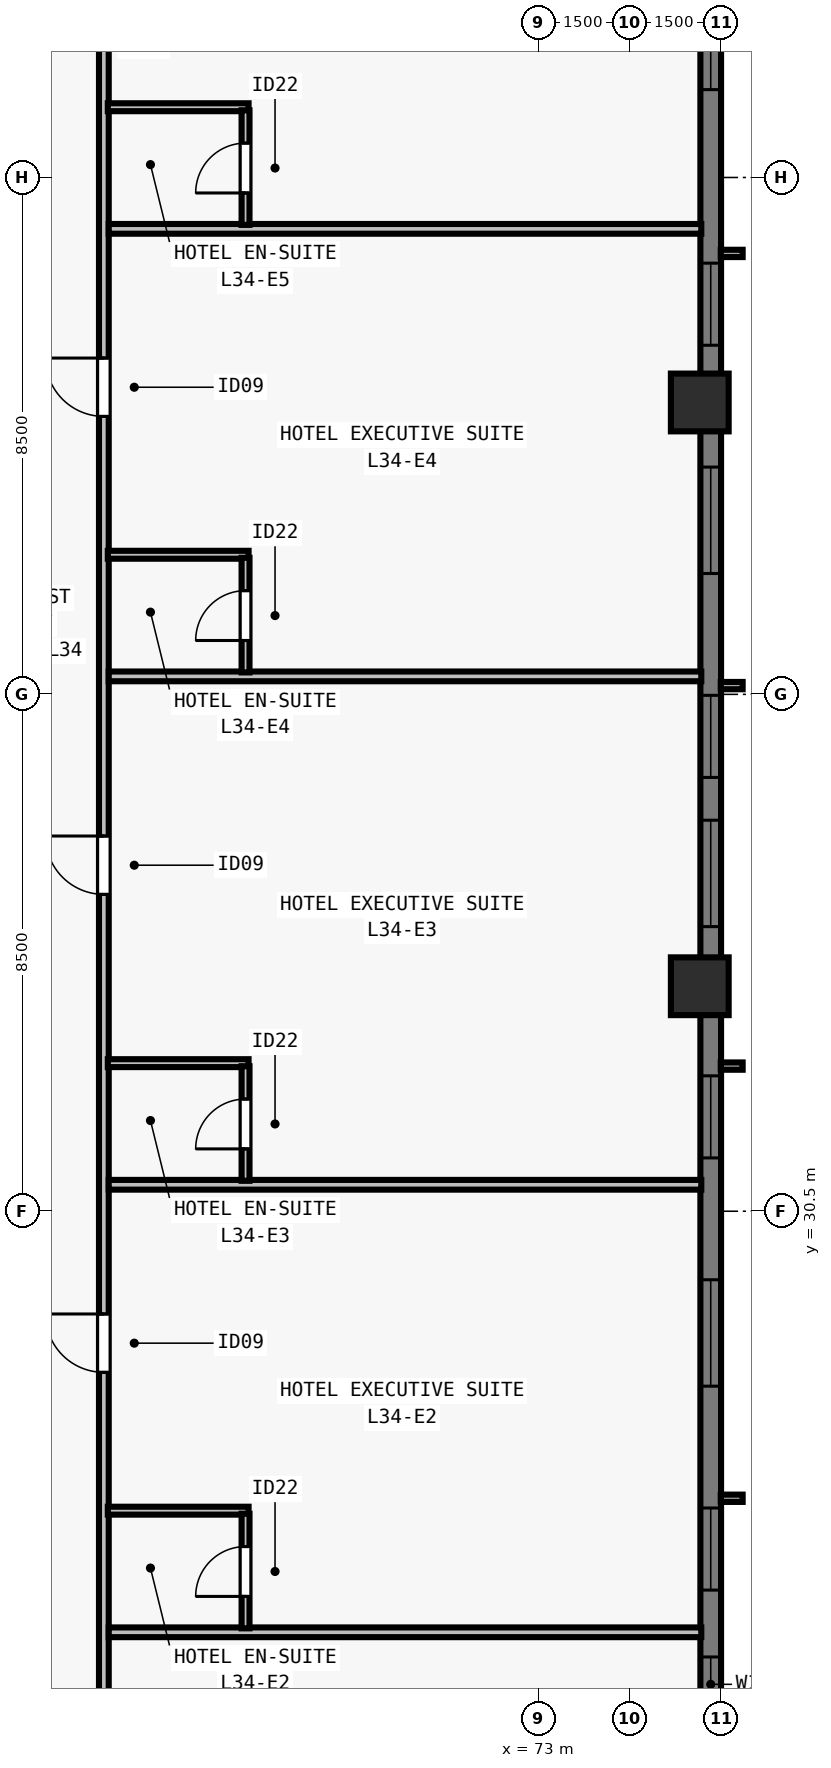
"""IFC4 building model, lengths in metres.
Left out: names, types, materials, properties, quantities, classifications, styles, units other than length and angle.
Written with IfcOpenShell. Run it as: python <this file> out.ifc"""

import sys

from ifc_helpers import new_model, si_unit, direction, frame, frame_2d, origin, origin_2d, place, context, subcontext, project, spatial, rectangle, extrude, element, fill, save


model = new_model("IFC4")
c1 = context("Model", 3, precision=1e-05, world=origin(), true_north=direction((0.0, 1.0)))
c2 = subcontext(c1, "Body", "Model", "MODEL_VIEW")
j1 = project(units=[si_unit("LENGTHUNIT", "METRE"), si_unit("PLANEANGLEUNIT", "RADIAN")], contexts=[c1])
p1 = place(None, origin())
s1 = spatial("IfcSite", under=j1, at=p1, CompositionType="ELEMENT")
p2 = place(p1, origin())
s2 = spatial("IfcBuilding", under=s1, at=p2, CompositionType="ELEMENT")
p3 = place(p2, frame((0.0, 0.0, 127.0)))
s3 = spatial("IfcBuildingStorey", under=s2, at=p3, CompositionType="ELEMENT", Elevation=127.0)
for number, where, z_axis, x_axis in (
    (1, (75.65, 34.2, 0.0), (0.0, 0.0, 1.0), (0.0, 1.0, 0.0)),
    (2, (75.65, 43.8, 0.0), (0.0, 0.0, 1.0), (0.0, 1.0, 0.0)),
):
    element("IfcColumn", number, at=place(p3, frame(where, z_axis=z_axis, x_axis=x_axis)), inside=s3, PredefinedType="COLUMN", context=c2, shape_type="SweptSolid", body=[
        extrude(rectangle(XDim=0.95, YDim=0.95, at=origin_2d()), origin(), (0.0, 0.0, 1.0), 3.5),
    ])
p4 = place(p3, frame((75.83, 59.0, 0.0), z_axis=(0.0, 0.0, 1.0), x_axis=(0.0, -1.0, 0.0)))
e3 = element("IfcWall", 3, at=p4, inside=s3, PredefinedType="SOLIDWALL", context=c2, shape_type="SweptSolid", body=[
    extrude(rectangle(XDim=39.682, YDim=0.34, at=frame_2d((19.841, 0.0))), origin(), (0.0, 0.0, 1.0), 3.28),
])
p5 = place(p4, frame((4.952, 0.0, 0.8)))
e4 = element("IfcOpeningElement", 4, at=p5, cuts=e3, PredefinedType="OPENING", context=c2, shape_type="SweptSolid", body=[
    extrude(rectangle(XDim=1.35, YDim=1.66, at=frame_2d((0.675, 0.83))), frame((0.0, 0.18, 0.0), z_axis=(0.0, -1.0, 0.0), x_axis=(1.0, 0.0, 0.0)), (0.0, 0.0, 1.0), 0.36),
])
p6 = place(p4, frame((8.305, 0.0, 0.8)))
e5 = element("IfcOpeningElement", 5, at=p6, cuts=e3, PredefinedType="OPENING", context=c2, shape_type="SweptSolid", body=[
    extrude(rectangle(XDim=1.75, YDim=1.66, at=frame_2d((0.875, 0.83))), frame((0.0, 0.18, 0.0), z_axis=(0.0, -1.0, 0.0), x_axis=(1.0, 0.0, 0.0)), (0.0, 0.0, 1.0), 0.36),
])
p7 = place(p4, frame((12.909, 0.0, 0.8)))
e6 = element("IfcOpeningElement", 6, at=p7, cuts=e3, PredefinedType="OPENING", context=c2, shape_type="SweptSolid", body=[
    extrude(rectangle(XDim=1.35, YDim=1.66, at=frame_2d((0.675, 0.83))), frame((0.0, 0.18, 0.0), z_axis=(0.0, -1.0, 0.0), x_axis=(1.0, 0.0, 0.0)), (0.0, 0.0, 1.0), 0.36),
])
p8 = place(p4, frame((16.262, 0.0, 0.8)))
e7 = element("IfcOpeningElement", 7, at=p8, cuts=e3, PredefinedType="OPENING", context=c2, shape_type="SweptSolid", body=[
    extrude(rectangle(XDim=1.75, YDim=1.66, at=frame_2d((0.875, 0.83))), frame((0.0, 0.18, 0.0), z_axis=(0.0, -1.0, 0.0), x_axis=(1.0, 0.0, 0.0)), (0.0, 0.0, 1.0), 0.36),
])
p9 = place(p4, frame((20.016, 0.0, 0.8)))
e8 = element("IfcOpeningElement", 8, at=p9, cuts=e3, PredefinedType="OPENING", context=c2, shape_type="SweptSolid", body=[
    extrude(rectangle(XDim=1.35, YDim=1.66, at=frame_2d((0.675, 0.83))), frame((0.0, 0.18, 0.0), z_axis=(0.0, -1.0, 0.0), x_axis=(1.0, 0.0, 0.0)), (0.0, 0.0, 1.0), 0.36),
])
p10 = place(p4, frame((22.07, 0.0, 0.8)))
e9 = element("IfcOpeningElement", 9, at=p10, cuts=e3, PredefinedType="OPENING", context=c2, shape_type="SweptSolid", body=[
    extrude(rectangle(XDim=1.75, YDim=1.66, at=frame_2d((0.875, 0.83))), frame((0.0, 0.18, 0.0), z_axis=(0.0, -1.0, 0.0), x_axis=(1.0, 0.0, 0.0)), (0.0, 0.0, 1.0), 0.36),
])
p11 = place(p4, frame((26.273, 0.0, 0.8)))
e10 = element("IfcOpeningElement", 10, at=p11, cuts=e3, PredefinedType="OPENING", context=c2, shape_type="SweptSolid", body=[
    extrude(rectangle(XDim=1.35, YDim=1.66, at=frame_2d((0.675, 0.83))), frame((0.0, 0.18, 0.0), z_axis=(0.0, -1.0, 0.0), x_axis=(1.0, 0.0, 0.0)), (0.0, 0.0, 1.0), 0.36),
])
p12 = place(p4, frame((29.627, 0.0, 0.8)))
e11 = element("IfcOpeningElement", 11, at=p12, cuts=e3, PredefinedType="OPENING", context=c2, shape_type="SweptSolid", body=[
    extrude(rectangle(XDim=1.75, YDim=1.66, at=frame_2d((0.875, 0.83))), frame((0.0, 0.18, 0.0), z_axis=(0.0, -1.0, 0.0), x_axis=(1.0, 0.0, 0.0)), (0.0, 0.0, 1.0), 0.36),
])
p13 = place(p4, frame((33.38, 0.0, 0.8)))
e12 = element("IfcOpeningElement", 12, at=p13, cuts=e3, PredefinedType="OPENING", context=c2, shape_type="SweptSolid", body=[
    extrude(rectangle(XDim=1.35, YDim=1.66, at=frame_2d((0.675, 0.83))), frame((0.0, 0.18, 0.0), z_axis=(0.0, -1.0, 0.0), x_axis=(1.0, 0.0, 0.0)), (0.0, 0.0, 1.0), 0.36),
])
p14 = place(p4, frame((35.83, 0.0, 0.8)))
e13 = element("IfcOpeningElement", 13, at=p14, cuts=e3, PredefinedType="OPENING", context=c2, shape_type="SweptSolid", body=[
    extrude(rectangle(XDim=0.9, YDim=1.66, at=frame_2d((0.45, 0.83))), frame((0.0, 0.18, 0.0), z_axis=(0.0, -1.0, 0.0), x_axis=(1.0, 0.0, 0.0)), (0.0, 0.0, 1.0), 0.36),
])
p15 = place(p3, frame((65.85, 15.325, 0.0), z_axis=(0.0, 0.0, 1.0), x_axis=(0.0, 1.0, 0.0)))
e14 = element("IfcWall", 14, at=p15, inside=s3, PredefinedType="PARTITIONING", context=c2, shape_type="SweptSolid", body=[
    extrude(rectangle(XDim=47.35, YDim=0.16, at=frame_2d((23.675, 0.0))), origin(), (0.0, 0.0, 1.0), 2.555),
])
p16 = place(p15, frame((4.993, 0.0, 0.0)))
e15 = element("IfcOpeningElement", 15, at=p16, cuts=e14, PredefinedType="OPENING", context=c2, shape_type="SweptSolid", body=[
    extrude(rectangle(XDim=0.96, YDim=2.15, at=frame_2d((0.48, 1.075))), frame((0.0, 0.09, 0.0), z_axis=(0.0, -1.0, 0.0), x_axis=(1.0, 0.0, 0.0)), (0.0, 0.0, 1.0), 0.18),
])
p17 = place(p15, frame((12.525, 0.0, 0.0)))
e16 = element("IfcOpeningElement", 16, at=p17, cuts=e14, PredefinedType="OPENING", context=c2, shape_type="SweptSolid", body=[
    extrude(rectangle(XDim=0.96, YDim=2.15, at=frame_2d((0.48, 1.075))), frame((0.0, 0.09, 0.0), z_axis=(0.0, -1.0, 0.0), x_axis=(1.0, 0.0, 0.0)), (0.0, 0.0, 1.0), 0.18),
])
p18 = place(p15, frame((20.385, 0.0, 0.0)))
e17 = element("IfcOpeningElement", 17, at=p18, cuts=e14, PredefinedType="OPENING", context=c2, shape_type="SweptSolid", body=[
    extrude(rectangle(XDim=0.96, YDim=2.15, at=frame_2d((0.48, 1.075))), frame((0.0, 0.09, 0.0), z_axis=(0.0, -1.0, 0.0), x_axis=(1.0, 0.0, 0.0)), (0.0, 0.0, 1.0), 0.18),
])
p19 = place(p15, frame((28.246, 0.0, 0.0)))
e18 = element("IfcOpeningElement", 18, at=p19, cuts=e14, PredefinedType="OPENING", context=c2, shape_type="SweptSolid", body=[
    extrude(rectangle(XDim=0.96, YDim=2.15, at=frame_2d((0.48, 1.075))), frame((0.0, 0.09, 0.0), z_axis=(0.0, -1.0, 0.0), x_axis=(1.0, 0.0, 0.0)), (0.0, 0.0, 1.0), 0.18),
])
p20 = place(p15, frame((36.105, 0.0, 0.0)))
e19 = element("IfcOpeningElement", 19, at=p20, cuts=e14, PredefinedType="OPENING", context=c2, shape_type="SweptSolid", body=[
    extrude(rectangle(XDim=0.96, YDim=2.15, at=frame_2d((0.48, 1.075))), frame((0.0, 0.09, 0.0), z_axis=(0.0, -1.0, 0.0), x_axis=(1.0, 0.0, 0.0)), (0.0, 0.0, 1.0), 0.18),
])
p21 = place(p15, frame((44.068, 0.0, 0.0)))
e20 = element("IfcOpeningElement", 20, at=p21, cuts=e14, PredefinedType="OPENING", context=c2, shape_type="SweptSolid", body=[
    extrude(rectangle(XDim=0.96, YDim=2.15, at=frame_2d((0.48, 1.075))), frame((0.0, 0.09, 0.0), z_axis=(0.0, -1.0, 0.0), x_axis=(1.0, 0.0, 0.0)), (0.0, 0.0, 1.0), 0.18),
])
p22 = place(p3, frame((65.93, 23.576, 0.0), z_axis=(0.0, 0.0, 1.0), x_axis=(1.0, 0.0, 0.0)))
e21 = element("IfcWall", 21, at=p22, inside=s3, PredefinedType="PARTITIONING", context=c2, shape_type="SweptSolid", body=[
    extrude(rectangle(XDim=9.745, YDim=0.16, at=frame_2d((4.873, 0.0))), origin(), (0.0, 0.0, 1.0), 2.896),
])
p23 = place(p3, frame((65.915, 25.576, 0.0), z_axis=(0.0, 0.0, 1.0), x_axis=(1.0, 0.0, 0.0)))
e22 = element("IfcWall", 22, at=p23, inside=s3, PredefinedType="PLUMBINGWALL", context=c2, shape_type="SweptSolid", body=[
    extrude(rectangle(XDim=2.315, YDim=0.13, at=frame_2d((1.157, 0.0))), origin(), (0.0, 0.0, 1.0), 2.896),
])
p24 = place(p3, frame((68.18, 23.641, 0.0), z_axis=(0.0, 0.0, 1.0), x_axis=(0.0, 1.0, 0.0)))
e23 = element("IfcWall", 23, at=p24, inside=s3, PredefinedType="PLUMBINGWALL", context=c2, shape_type="SweptSolid", body=[
    extrude(rectangle(XDim=1.885, YDim=0.13, at=frame_2d((0.942, 0.0))), origin(), (0.0, 0.0, 1.0), 3.28),
])
p25 = place(p24, frame((0.525, 0.0, 0.0)))
e24 = element("IfcOpeningElement", 24, at=p25, cuts=e23, PredefinedType="OPENING", context=c2, shape_type="SweptSolid", body=[
    extrude(rectangle(XDim=0.82, YDim=2.1, at=frame_2d((0.41, 1.05))), frame((0.0, 0.075, 0.0), z_axis=(0.0, -1.0, 0.0), x_axis=(1.0, 0.0, 0.0)), (0.0, 0.0, 1.0), 0.15),
])
p26 = place(p3, frame((65.93, 30.935, 0.0), z_axis=(0.0, 0.0, 1.0), x_axis=(1.0, 0.0, 0.0)))
e25 = element("IfcWall", 25, at=p26, inside=s3, PredefinedType="PARTITIONING", context=c2, shape_type="SweptSolid", body=[
    extrude(rectangle(XDim=9.745, YDim=0.16, at=frame_2d((4.873, 0.0))), origin(), (0.0, 0.0, 1.0), 3.28),
])
p27 = place(p3, frame((65.915, 32.935, 0.0), z_axis=(0.0, 0.0, 1.0), x_axis=(1.0, 0.0, 0.0)))
e26 = element("IfcWall", 26, at=p27, inside=s3, PredefinedType="PLUMBINGWALL", context=c2, shape_type="SweptSolid", body=[
    extrude(rectangle(XDim=2.315, YDim=0.13, at=frame_2d((1.157, 0.0))), origin(), (0.0, 0.0, 1.0), 3.28),
])
p28 = place(p3, frame((68.18, 31.0, 0.0), z_axis=(0.0, 0.0, 1.0), x_axis=(0.0, 1.0, 0.0)))
e27 = element("IfcWall", 27, at=p28, inside=s3, PredefinedType="PLUMBINGWALL", context=c2, shape_type="SweptSolid", body=[
    extrude(rectangle(XDim=1.885, YDim=0.13, at=frame_2d((0.942, 0.0))), origin(), (0.0, 0.0, 1.0), 3.28),
])
p29 = place(p28, frame((0.525, 0.0, 0.0)))
e28 = element("IfcOpeningElement", 28, at=p29, cuts=e27, PredefinedType="OPENING", context=c2, shape_type="SweptSolid", body=[
    extrude(rectangle(XDim=0.82, YDim=2.1, at=frame_2d((0.41, 1.05))), frame((0.0, 0.075, 0.0), z_axis=(0.0, -1.0, 0.0), x_axis=(1.0, 0.0, 0.0)), (0.0, 0.0, 1.0), 0.15),
])
p30 = place(p3, frame((65.93, 39.296, 0.0), z_axis=(0.0, 0.0, 1.0), x_axis=(1.0, 0.0, 0.0)))
e29 = element("IfcWall", 29, at=p30, inside=s3, PredefinedType="PARTITIONING", context=c2, shape_type="SweptSolid", body=[
    extrude(rectangle(XDim=9.745, YDim=0.16, at=frame_2d((4.873, 0.0))), origin(), (0.0, 0.0, 1.0), 3.28),
])
p31 = place(p3, frame((65.915, 41.296, 0.0), z_axis=(0.0, 0.0, 1.0), x_axis=(1.0, 0.0, 0.0)))
e30 = element("IfcWall", 30, at=p31, inside=s3, PredefinedType="PLUMBINGWALL", context=c2, shape_type="SweptSolid", body=[
    extrude(rectangle(XDim=2.315, YDim=0.13, at=frame_2d((1.157, 0.0))), origin(), (0.0, 0.0, 1.0), 3.28),
])
p32 = place(p3, frame((68.18, 39.361, 0.0), z_axis=(0.0, 0.0, 1.0), x_axis=(0.0, 1.0, 0.0)))
e31 = element("IfcWall", 31, at=p32, inside=s3, PredefinedType="PLUMBINGWALL", context=c2, shape_type="SweptSolid", body=[
    extrude(rectangle(XDim=1.885, YDim=0.13, at=frame_2d((0.942, 0.0))), origin(), (0.0, 0.0, 1.0), 3.28),
])
p33 = place(p32, frame((0.525, 0.0, 0.0)))
e32 = element("IfcOpeningElement", 32, at=p33, cuts=e31, PredefinedType="OPENING", context=c2, shape_type="SweptSolid", body=[
    extrude(rectangle(XDim=0.82, YDim=2.1, at=frame_2d((0.41, 1.05))), frame((0.0, 0.075, 0.0), z_axis=(0.0, -1.0, 0.0), x_axis=(1.0, 0.0, 0.0)), (0.0, 0.0, 1.0), 0.15),
])
p34 = place(p3, frame((65.93, 46.655, 0.0), z_axis=(0.0, 0.0, 1.0), x_axis=(1.0, 0.0, 0.0)))
e33 = element("IfcWall", 33, at=p34, inside=s3, PredefinedType="PARTITIONING", context=c2, shape_type="SweptSolid", body=[
    extrude(rectangle(XDim=9.745, YDim=0.16, at=frame_2d((4.873, 0.0))), origin(), (0.0, 0.0, 1.0), 3.28),
])
p35 = place(p3, frame((65.915, 48.655, 0.0), z_axis=(0.0, 0.0, 1.0), x_axis=(1.0, 0.0, 0.0)))
e34 = element("IfcWall", 34, at=p35, inside=s3, PredefinedType="PLUMBINGWALL", context=c2, shape_type="SweptSolid", body=[
    extrude(rectangle(XDim=2.315, YDim=0.13, at=frame_2d((1.157, 0.0))), origin(), (0.0, 0.0, 1.0), 3.28),
])
p36 = place(p3, frame((68.18, 46.72, 0.0), z_axis=(0.0, 0.0, 1.0), x_axis=(0.0, 1.0, 0.0)))
e35 = element("IfcWall", 35, at=p36, inside=s3, PredefinedType="PLUMBINGWALL", context=c2, shape_type="SweptSolid", body=[
    extrude(rectangle(XDim=1.885, YDim=0.13, at=frame_2d((0.942, 0.0))), origin(), (0.0, 0.0, 1.0), 3.28),
])
p37 = place(p36, frame((0.525, 0.0, 0.0)))
e36 = element("IfcOpeningElement", 36, at=p37, cuts=e35, PredefinedType="OPENING", context=c2, shape_type="SweptSolid", body=[
    extrude(rectangle(XDim=0.82, YDim=2.1, at=frame_2d((0.41, 1.05))), frame((0.0, 0.075, 0.0), z_axis=(0.0, -1.0, 0.0), x_axis=(1.0, 0.0, 0.0)), (0.0, 0.0, 1.0), 0.15),
])
p38 = place(p6, origin())
e37 = element("IfcWindow", 37, at=p38, inside=s3, PartitioningType="SINGLE_PANEL", PredefinedType="WINDOW", context=c2, shape_type="SweptSolid", body=[
    extrude(rectangle(XDim=1.75, YDim=1.66, at=frame_2d((0.875, 0.83))), frame((0.0, -0.05, 0.0), z_axis=(0.0, -1.0, 0.0), x_axis=(1.0, 0.0, 0.0)), (0.0, 0.0, 1.0), 0.06),
])
fill(e5, e37)
p39 = place(p7, origin())
e38 = element("IfcWindow", 38, at=p39, inside=s3, PartitioningType="SINGLE_PANEL", PredefinedType="WINDOW", context=c2, shape_type="SweptSolid", body=[
    extrude(rectangle(XDim=1.35, YDim=1.66, at=frame_2d((0.675, 0.83))), frame((0.0, -0.05, 0.0), z_axis=(0.0, -1.0, 0.0), x_axis=(1.0, 0.0, 0.0)), (0.0, 0.0, 1.0), 0.06),
])
fill(e6, e38)
p40 = place(p8, origin())
e39 = element("IfcWindow", 39, at=p40, inside=s3, PartitioningType="SINGLE_PANEL", PredefinedType="WINDOW", context=c2, shape_type="SweptSolid", body=[
    extrude(rectangle(XDim=1.75, YDim=1.66, at=frame_2d((0.875, 0.83))), frame((0.0, -0.05, 0.0), z_axis=(0.0, -1.0, 0.0), x_axis=(1.0, 0.0, 0.0)), (0.0, 0.0, 1.0), 0.06),
])
fill(e7, e39)
p41 = place(p9, origin())
e40 = element("IfcWindow", 40, at=p41, inside=s3, PartitioningType="SINGLE_PANEL", PredefinedType="WINDOW", context=c2, shape_type="SweptSolid", body=[
    extrude(rectangle(XDim=1.35, YDim=1.66, at=frame_2d((0.675, 0.83))), frame((0.0, -0.05, 0.0), z_axis=(0.0, -1.0, 0.0), x_axis=(1.0, 0.0, 0.0)), (0.0, 0.0, 1.0), 0.06),
])
fill(e8, e40)
p42 = place(p10, origin())
e41 = element("IfcWindow", 41, at=p42, inside=s3, PartitioningType="SINGLE_PANEL", PredefinedType="WINDOW", context=c2, shape_type="SweptSolid", body=[
    extrude(rectangle(XDim=1.75, YDim=1.66, at=frame_2d((0.875, 0.83))), frame((0.0, -0.05, 0.0), z_axis=(0.0, -1.0, 0.0), x_axis=(1.0, 0.0, 0.0)), (0.0, 0.0, 1.0), 0.06),
])
fill(e9, e41)
p43 = place(p11, origin())
e42 = element("IfcWindow", 42, at=p43, inside=s3, PartitioningType="SINGLE_PANEL", PredefinedType="WINDOW", context=c2, shape_type="SweptSolid", body=[
    extrude(rectangle(XDim=1.35, YDim=1.66, at=frame_2d((0.675, 0.83))), frame((0.0, -0.05, 0.0), z_axis=(0.0, -1.0, 0.0), x_axis=(1.0, 0.0, 0.0)), (0.0, 0.0, 1.0), 0.06),
])
fill(e10, e42)
p44 = place(p12, origin())
e43 = element("IfcWindow", 43, at=p44, inside=s3, PartitioningType="SINGLE_PANEL", PredefinedType="WINDOW", context=c2, shape_type="SweptSolid", body=[
    extrude(rectangle(XDim=1.75, YDim=1.66, at=frame_2d((0.875, 0.83))), frame((0.0, -0.05, 0.0), z_axis=(0.0, -1.0, 0.0), x_axis=(1.0, 0.0, 0.0)), (0.0, 0.0, 1.0), 0.06),
])
fill(e11, e43)
p45 = place(p13, origin())
e44 = element("IfcWindow", 44, at=p45, inside=s3, PartitioningType="SINGLE_PANEL", PredefinedType="WINDOW", context=c2, shape_type="SweptSolid", body=[
    extrude(rectangle(XDim=1.35, YDim=1.66, at=frame_2d((0.675, 0.83))), frame((0.0, -0.05, 0.0), z_axis=(0.0, -1.0, 0.0), x_axis=(1.0, 0.0, 0.0)), (0.0, 0.0, 1.0), 0.06),
])
fill(e12, e44)
p46 = place(p14, origin())
e45 = element("IfcWindow", 45, at=p46, inside=s3, PartitioningType="SINGLE_PANEL", PredefinedType="WINDOW", context=c2, shape_type="SweptSolid", body=[
    extrude(rectangle(XDim=0.9, YDim=1.66, at=frame_2d((0.45, 0.83))), frame((0.0, -0.04, 0.0), z_axis=(0.0, -1.0, 0.0), x_axis=(1.0, 0.0, 0.0)), (0.0, 0.0, 1.0), 0.06),
])
fill(e13, e45)
p47 = place(p25, origin())
e46 = element("IfcDoor", 46, at=p47, inside=s3, OperationType="SINGLE_SWING_LEFT", PredefinedType="DOOR", context=c2, shape_type="SweptSolid", body=[
    extrude(rectangle(XDim=0.82, YDim=2.1, at=frame_2d((0.41, 1.05))), frame((0.0, 0.025, 0.0), z_axis=(0.0, -1.0, 0.0), x_axis=(1.0, 0.0, 0.0)), (0.0, 0.0, 1.0), 0.05),
])
fill(e24, e46)
p48 = place(p17, origin())
e47 = element("IfcDoor", 47, at=p48, inside=s3, OperationType="SINGLE_SWING_RIGHT", PredefinedType="DOOR", context=c2, shape_type="SweptSolid", body=[
    extrude(rectangle(XDim=0.96, YDim=2.15, at=frame_2d((0.48, 1.075))), frame((0.0, 0.025, 0.0), z_axis=(0.0, -1.0, 0.0), x_axis=(1.0, 0.0, 0.0)), (0.0, 0.0, 1.0), 0.05),
])
fill(e16, e47)
p49 = place(p29, origin())
e48 = element("IfcDoor", 48, at=p49, inside=s3, OperationType="SINGLE_SWING_LEFT", PredefinedType="DOOR", context=c2, shape_type="SweptSolid", body=[
    extrude(rectangle(XDim=0.82, YDim=2.1, at=frame_2d((0.41, 1.05))), frame((0.0, 0.025, 0.0), z_axis=(0.0, -1.0, 0.0), x_axis=(1.0, 0.0, 0.0)), (0.0, 0.0, 1.0), 0.05),
])
fill(e28, e48)
p50 = place(p18, origin())
e49 = element("IfcDoor", 49, at=p50, inside=s3, OperationType="SINGLE_SWING_RIGHT", PredefinedType="DOOR", context=c2, shape_type="SweptSolid", body=[
    extrude(rectangle(XDim=0.96, YDim=2.15, at=frame_2d((0.48, 1.075))), frame((0.0, 0.025, 0.0), z_axis=(0.0, -1.0, 0.0), x_axis=(1.0, 0.0, 0.0)), (0.0, 0.0, 1.0), 0.05),
])
fill(e17, e49)
p51 = place(p33, origin())
e50 = element("IfcDoor", 50, at=p51, inside=s3, OperationType="SINGLE_SWING_LEFT", PredefinedType="DOOR", context=c2, shape_type="SweptSolid", body=[
    extrude(rectangle(XDim=0.82, YDim=2.1, at=frame_2d((0.41, 1.05))), frame((0.0, 0.025, 0.0), z_axis=(0.0, -1.0, 0.0), x_axis=(1.0, 0.0, 0.0)), (0.0, 0.0, 1.0), 0.05),
])
fill(e32, e50)
p52 = place(p19, origin())
e51 = element("IfcDoor", 51, at=p52, inside=s3, OperationType="SINGLE_SWING_RIGHT", PredefinedType="DOOR", context=c2, shape_type="SweptSolid", body=[
    extrude(rectangle(XDim=0.96, YDim=2.15, at=frame_2d((0.48, 1.075))), frame((0.0, 0.025, 0.0), z_axis=(0.0, -1.0, 0.0), x_axis=(1.0, 0.0, 0.0)), (0.0, 0.0, 1.0), 0.05),
])
fill(e18, e51)
p53 = place(p37, origin())
e52 = element("IfcDoor", 52, at=p53, inside=s3, OperationType="SINGLE_SWING_LEFT", PredefinedType="DOOR", context=c2, shape_type="SweptSolid", body=[
    extrude(rectangle(XDim=0.82, YDim=2.1, at=frame_2d((0.41, 1.05))), frame((0.0, 0.025, 0.0), z_axis=(0.0, -1.0, 0.0), x_axis=(1.0, 0.0, 0.0)), (0.0, 0.0, 1.0), 0.05),
])
fill(e36, e52)
save(model, sys.argv[1])
